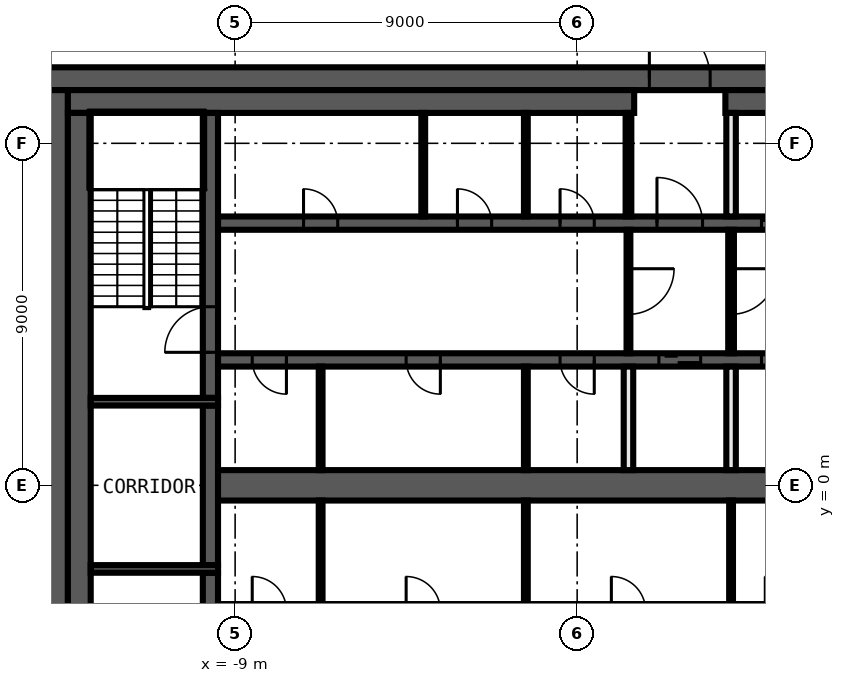
"""IFC4 building model, lengths in metres.
Left out: names, types, materials, properties, quantities, classifications, styles, units other than length and angle.
Written with IfcOpenShell. Run it as: python <this file> out.ifc"""

import sys

from ifc_helpers import new_model, si_unit, direction, frame, frame_2d, origin, place, context, subcontext, project, spatial, rectangle, extrude, element, fill, save


model = new_model("IFC4")
c1 = context("Model", 3, precision=1e-05, world=origin(), true_north=direction((0.0, 1.0)))
c2 = subcontext(c1, "Body", "Model", "MODEL_VIEW")
j1 = project(units=[si_unit("LENGTHUNIT", "METRE"), si_unit("PLANEANGLEUNIT", "RADIAN")], contexts=[c1])
p1 = place(None, origin())
s1 = spatial("IfcSite", under=j1, at=p1, CompositionType="ELEMENT")
p2 = place(p1, origin())
s2 = spatial("IfcBuilding", under=s1, at=p2, CompositionType="ELEMENT")
p3 = place(p2, frame((0.0, 0.0, 367.4)))
s3 = spatial("IfcBuildingStorey", under=s2, at=p3, CompositionType="ELEMENT", Elevation=367.4)
p4 = place(p3, frame((-11.138, 20.28, 0.0), z_axis=(0.0, 0.0, 1.0), x_axis=(-0.441342255748, -0.897338850876, 0.0)))
e1 = element("IfcWall", 1, at=p4, inside=s3, PredefinedType="SOLIDWALL", context=c2, shape_type="SweptSolid", body=[
    extrude(rectangle(XDim=28.805, YDim=0.25, at=frame_2d((14.403, 0.0))), origin(), (0.0, 0.0, 1.0), 3.8),
])
p5 = place(p3, frame((-14.0, 10.7, 0.0), z_axis=(0.0, 0.0, 1.0), x_axis=(1.0, 0.0, 0.0)))
e2 = element("IfcWall", 2, at=p5, inside=s3, PredefinedType="SHEAR", context=c2, shape_type="SweptSolid", body=[
    extrude(rectangle(XDim=28.0, YDim=0.6, at=frame_2d((14.0, 0.0))), origin(), (0.0, 0.0, 1.0), 3.8),
])
p6 = place(p5, frame((15.9, 0.0, 0.0)))
e3 = element("IfcOpeningElement", 3, at=p6, cuts=e2, PredefinedType="OPENING", context=c2, shape_type="SweptSolid", body=[
    extrude(rectangle(XDim=1.6, YDim=2.1, at=frame_2d((0.8, 1.05))), frame((0.0, 0.31, 0.0), z_axis=(0.0, -1.0, 0.0), x_axis=(1.0, 0.0, 0.0)), (0.0, 0.0, 1.0), 0.62),
])
p7 = place(p3, frame((-13.7, -10.4, 0.0), z_axis=(0.0, 0.0, 1.0), x_axis=(0.0, 1.0, 0.0)))
e4 = element("IfcWall", 4, at=p7, inside=s3, PredefinedType="SHEAR", context=c2, shape_type="SweptSolid", body=[
    extrude(rectangle(XDim=20.8, YDim=0.6, at=frame_2d((10.4, 0.0))), origin(), (0.0, 0.0, 1.0), 3.8),
])
p8 = place(p3, frame((-13.4, 10.1, 0.0), z_axis=(0.0, 0.0, 1.0), x_axis=(1.0, 0.0, 0.0)))
e5 = element("IfcWall", 5, at=p8, inside=s3, PredefinedType="SHEAR", context=c2, shape_type="SweptSolid", body=[
    extrude(rectangle(XDim=14.9, YDim=0.6, at=frame_2d((7.45, 0.0))), origin(), (0.0, 0.0, 1.0), 3.8),
])
p9 = place(p3, frame((3.9, 10.1, 0.0), z_axis=(0.0, 0.0, 1.0), x_axis=(1.0, 0.0, 0.0)))
e6 = element("IfcWall", 6, at=p9, inside=s3, PredefinedType="SHEAR", context=c2, shape_type="SweptSolid", body=[
    extrude(rectangle(XDim=9.5, YDim=0.6, at=frame_2d((4.75, 0.0))), origin(), (0.0, 0.0, 1.0), 3.8),
])
p10 = place(p3, frame((-13.1, -9.8, 0.0), z_axis=(0.0, 0.0, 1.0), x_axis=(0.0, 1.0, 0.0)))
e7 = element("IfcWall", 7, at=p10, inside=s3, PredefinedType="SHEAR", context=c2, shape_type="SweptSolid", body=[
    extrude(rectangle(XDim=19.6, YDim=0.6, at=frame_2d((9.8, 0.0))), origin(), (0.0, 0.0, 1.0), 3.8),
])
p11 = place(p3, frame((-9.65, -9.8, 0.0), z_axis=(0.0, 0.0, 1.0), x_axis=(0.0, 1.0, 0.0)))
e8 = element("IfcWall", 8, at=p11, inside=s3, PredefinedType="SHEAR", context=c2, shape_type="SweptSolid", body=[
    extrude(rectangle(XDim=7.5, YDim=0.4, at=frame_2d((3.75, 0.0))), origin(), (0.0, 0.0, 1.0), 3.8),
])
p12 = place(p11, frame((5.1, 0.0, 0.0)))
e9 = element("IfcOpeningElement", 9, at=p12, cuts=e8, PredefinedType="OPENING", context=c2, shape_type="SweptSolid", body=[
    extrude(rectangle(XDim=1.2, YDim=2.1, at=frame_2d((0.6, 1.05))), frame((0.0, 0.21, 0.0), z_axis=(0.0, -1.0, 0.0), x_axis=(1.0, 0.0, 0.0)), (0.0, 0.0, 1.0), 0.42),
])
p13 = place(p3, frame((-9.65, -2.1, 0.0), z_axis=(0.0, 0.0, 1.0), x_axis=(0.0, 1.0, 0.0)))
e10 = element("IfcWall", 10, at=p13, inside=s3, PredefinedType="SHEAR", context=c2, shape_type="SweptSolid", body=[
    extrude(rectangle(XDim=4.2, YDim=0.4, at=frame_2d((2.1, 0.0))), origin(), (0.0, 0.0, 1.0), 3.8),
])
p14 = place(p3, frame((-9.65, 2.3, 0.0), z_axis=(0.0, 0.0, 1.0), x_axis=(0.0, 1.0, 0.0)))
e11 = element("IfcWall", 11, at=p14, inside=s3, PredefinedType="SHEAR", context=c2, shape_type="SweptSolid", body=[
    extrude(rectangle(XDim=7.5, YDim=0.4, at=frame_2d((3.75, 0.0))), origin(), (0.0, 0.0, 1.0), 3.8),
])
p15 = place(p14, frame((1.2, 0.0, 0.0)))
e12 = element("IfcOpeningElement", 12, at=p15, cuts=e11, PredefinedType="OPENING", context=c2, shape_type="SweptSolid", body=[
    extrude(rectangle(XDim=1.2, YDim=2.1, at=frame_2d((0.6, 1.05))), frame((0.0, 0.21, 0.0), z_axis=(0.0, -1.0, 0.0), x_axis=(1.0, 0.0, 0.0)), (0.0, 0.0, 1.0), 0.42),
])
for number, where, z_axis, x_axis in (
    (13, (-9.45, 2.2, 0.0), (0.0, 0.0, 1.0), (-1.0, 0.0, 0.0)),
    (14, (-9.45, -2.2, 0.0), (0.0, 0.0, 1.0), (-1.0, 0.0, 0.0)),
):
    element("IfcWall", number, at=place(p3, frame(where, z_axis=z_axis, x_axis=x_axis)), inside=s3, PredefinedType="SHEAR", context=c2, shape_type="SweptSolid", body=[
        extrude(rectangle(XDim=3.35, YDim=0.2, at=frame_2d((1.675, 0.0))), origin(), (0.0, 0.0, 1.0), 3.8),
    ])
p16 = place(p3, frame((-9.45, 6.9, 0.0), z_axis=(0.0, 0.0, 1.0), x_axis=(1.0, 0.0, 0.0)))
e15 = element("IfcWall", 15, at=p16, inside=s3, PredefinedType="SHEAR", context=c2, shape_type="SweptSolid", body=[
    extrude(rectangle(XDim=18.9, YDim=0.35, at=frame_2d((9.45, 0.0))), origin(), (0.0, 0.0, 1.0), 3.8),
])
p17 = place(p16, frame((11.55, 0.0, 0.0)))
e16 = element("IfcOpeningElement", 16, at=p17, cuts=e15, PredefinedType="OPENING", context=c2, shape_type="SweptSolid", body=[
    extrude(rectangle(XDim=1.2, YDim=2.1, at=frame_2d((0.6, 1.05))), frame((0.0, 0.185, 0.0), z_axis=(0.0, -1.0, 0.0), x_axis=(1.0, 0.0, 0.0)), (0.0, 0.0, 1.0), 0.37),
])
p18 = place(p16, frame((14.3, 0.0, 0.0)))
e17 = element("IfcOpeningElement", 17, at=p18, cuts=e15, PredefinedType="OPENING", context=c2, shape_type="SweptSolid", body=[
    extrude(rectangle(XDim=1.1, YDim=2.1, at=frame_2d((0.55, 1.05))), frame((0.0, 0.185, 0.0), z_axis=(0.0, -1.0, 0.0), x_axis=(1.0, 0.0, 0.0)), (0.0, 0.0, 1.0), 0.37),
])
p19 = place(p16, frame((17.0, 0.0, 0.0)))
e18 = element("IfcOpeningElement", 18, at=p19, cuts=e15, PredefinedType="OPENING", context=c2, shape_type="SweptSolid", body=[
    extrude(rectangle(XDim=1.1, YDim=2.1, at=frame_2d((0.55, 1.05))), frame((0.0, 0.185, 0.0), z_axis=(0.0, -1.0, 0.0), x_axis=(1.0, 0.0, 0.0)), (0.0, 0.0, 1.0), 0.37),
])
p20 = place(p16, frame((2.25, 0.0, 0.0)))
e19 = element("IfcOpeningElement", 19, at=p20, cuts=e15, PredefinedType="OPENING", context=c2, shape_type="SweptSolid", body=[
    extrude(rectangle(XDim=0.9, YDim=2.1, at=frame_2d((0.45, 1.05))), frame((0.0, 0.185, 0.0), z_axis=(0.0, -1.0, 0.0), x_axis=(1.0, 0.0, 0.0)), (0.0, 0.0, 1.0), 0.37),
])
p21 = place(p16, frame((6.3, 0.0, 0.0)))
e20 = element("IfcOpeningElement", 20, at=p21, cuts=e15, PredefinedType="OPENING", context=c2, shape_type="SweptSolid", body=[
    extrude(rectangle(XDim=0.9, YDim=2.1, at=frame_2d((0.45, 1.05))), frame((0.0, 0.185, 0.0), z_axis=(0.0, -1.0, 0.0), x_axis=(1.0, 0.0, 0.0)), (0.0, 0.0, 1.0), 0.37),
])
p22 = place(p16, frame((9.0, 0.0, 0.0)))
e21 = element("IfcOpeningElement", 21, at=p22, cuts=e15, PredefinedType="OPENING", context=c2, shape_type="SweptSolid", body=[
    extrude(rectangle(XDim=0.9, YDim=2.1, at=frame_2d((0.45, 1.05))), frame((0.0, 0.185, 0.0), z_axis=(0.0, -1.0, 0.0), x_axis=(1.0, 0.0, 0.0)), (0.0, 0.0, 1.0), 0.37),
])
p23 = place(p3, frame((9.45, 3.3, 0.0), z_axis=(0.0, 0.0, 1.0), x_axis=(-1.0, 0.0, 0.0)))
e22 = element("IfcWall", 22, at=p23, inside=s3, PredefinedType="SHEAR", context=c2, shape_type="SweptSolid", body=[
    extrude(rectangle(XDim=18.9, YDim=0.35, at=frame_2d((9.45, 0.0))), origin(), (0.0, 0.0, 1.0), 3.8),
])
p24 = place(p23, frame((6.2, 0.0, 0.0)))
e23 = element("IfcOpeningElement", 23, at=p24, cuts=e22, PredefinedType="OPENING", context=c2, shape_type="SweptSolid", body=[
    extrude(rectangle(XDim=1.1, YDim=2.1, at=frame_2d((0.55, 1.05))), frame((0.0, 0.185, 0.0), z_axis=(0.0, -1.0, 0.0), x_axis=(1.0, 0.0, 0.0)), (0.0, 0.0, 1.0), 0.37),
])
p25 = place(p23, frame((3.5, 0.0, 0.0)))
e24 = element("IfcOpeningElement", 24, at=p25, cuts=e22, PredefinedType="OPENING", context=c2, shape_type="SweptSolid", body=[
    extrude(rectangle(XDim=1.1, YDim=2.1, at=frame_2d((0.55, 1.05))), frame((0.0, 0.185, 0.0), z_axis=(0.0, -1.0, 0.0), x_axis=(1.0, 0.0, 0.0)), (0.0, 0.0, 1.0), 0.37),
])
p26 = place(p23, frame((0.9, 0.0, 0.0)))
e25 = element("IfcOpeningElement", 25, at=p26, cuts=e22, PredefinedType="OPENING", context=c2, shape_type="SweptSolid", body=[
    extrude(rectangle(XDim=0.9, YDim=2.1, at=frame_2d((0.45, 1.05))), frame((0.0, 0.185, 0.0), z_axis=(0.0, -1.0, 0.0), x_axis=(1.0, 0.0, 0.0)), (0.0, 0.0, 1.0), 0.37),
])
p27 = place(p23, frame((17.1, 0.0, 0.0)))
e26 = element("IfcOpeningElement", 26, at=p27, cuts=e22, PredefinedType="OPENING", context=c2, shape_type="SweptSolid", body=[
    extrude(rectangle(XDim=0.9, YDim=2.1, at=frame_2d((0.45, 1.05))), frame((0.0, 0.185, 0.0), z_axis=(0.0, -1.0, 0.0), x_axis=(1.0, 0.0, 0.0)), (0.0, 0.0, 1.0), 0.37),
])
p28 = place(p23, frame((13.05, 0.0, 0.0)))
e27 = element("IfcOpeningElement", 27, at=p28, cuts=e22, PredefinedType="OPENING", context=c2, shape_type="SweptSolid", body=[
    extrude(rectangle(XDim=0.9, YDim=2.1, at=frame_2d((0.45, 1.05))), frame((0.0, 0.185, 0.0), z_axis=(0.0, -1.0, 0.0), x_axis=(1.0, 0.0, 0.0)), (0.0, 0.0, 1.0), 0.37),
])
p29 = place(p23, frame((9.0, 0.0, 0.0)))
e28 = element("IfcOpeningElement", 28, at=p29, cuts=e22, PredefinedType="OPENING", context=c2, shape_type="SweptSolid", body=[
    extrude(rectangle(XDim=0.9, YDim=2.1, at=frame_2d((0.45, 1.05))), frame((0.0, 0.185, 0.0), z_axis=(0.0, -1.0, 0.0), x_axis=(1.0, 0.0, 0.0)), (0.0, 0.0, 1.0), 0.37),
])
p30 = place(p3, frame((-9.45, 0.0, 0.0), z_axis=(0.0, 0.0, 1.0), x_axis=(1.0, 0.0, 0.0)))
e29 = element("IfcWall", 29, at=p30, inside=s3, PredefinedType="SHEAR", context=c2, shape_type="SweptSolid", body=[
    extrude(rectangle(XDim=18.9, YDim=0.8, at=frame_2d((9.45, 0.0))), origin(), (0.0, 0.0, 1.0), 3.8),
])
p31 = place(p3, frame((4.05, 6.725, 0.0), z_axis=(0.0, 0.0, 1.0), x_axis=(0.0, -1.0, 0.0)))
e30 = element("IfcWall", 30, at=p31, inside=s3, PredefinedType="PARTITIONING", context=c2, shape_type="SweptSolid", body=[
    extrude(rectangle(XDim=3.25, YDim=0.15, at=frame_2d((1.625, 0.0))), origin(), (0.0, 0.0, 1.0), 3.8),
])
p32 = place(p31, frame((1.025, 0.0, 0.0)))
e31 = element("IfcOpeningElement", 31, at=p32, cuts=e30, PredefinedType="OPENING", context=c2, shape_type="SweptSolid", body=[
    extrude(rectangle(XDim=1.2, YDim=2.1, at=frame_2d((0.6, 1.05))), frame((0.0, 0.085, 0.0), z_axis=(0.0, -1.0, 0.0), x_axis=(1.0, 0.0, 0.0)), (0.0, 0.0, 1.0), 0.17),
])
p33 = place(p3, frame((4.05, -3.125, 0.0), z_axis=(0.0, 0.0, 1.0), x_axis=(0.0, 1.0, 0.0)))
e32 = element("IfcWall", 32, at=p33, inside=s3, PredefinedType="PARTITIONING", context=c2, shape_type="SweptSolid", body=[
    extrude(rectangle(XDim=2.725, YDim=0.1, at=frame_2d((1.363, 0.0))), origin(), (0.0, 0.0, 1.0), 3.8),
])
for number, where, z_axis, x_axis in (
    (33, (4.05, 0.4, 0.0), (0.0, 0.0, 1.0), (0.0, 1.0, 0.0)),
    (34, (4.05, 7.075, 0.0), (0.0, 0.0, 1.0), (0.0, 1.0, 0.0)),
):
    element("IfcWall", number, at=place(p3, frame(where, z_axis=z_axis, x_axis=x_axis)), inside=s3, PredefinedType="SOLIDWALL", context=c2, shape_type="SweptSolid", body=[
        extrude(rectangle(XDim=2.725, YDim=0.25, at=frame_2d((1.363, 0.0))), origin(), (0.0, 0.0, 1.0), 3.8),
    ])
p34 = place(p3, frame((1.35, 7.075, 0.0), z_axis=(0.0, 0.0, 1.0), x_axis=(0.0, 1.0, 0.0)))
e35 = element("IfcWall", 35, at=p34, inside=s3, PredefinedType="PARTITIONING", context=c2, shape_type="SweptSolid", body=[
    extrude(rectangle(XDim=2.725, YDim=0.15, at=frame_2d((1.363, 0.0))), origin(), (0.0, 0.0, 1.0), 3.8),
])
p35 = place(p3, frame((1.35, 6.725, 0.0), z_axis=(0.0, 0.0, 1.0), x_axis=(0.0, -1.0, 0.0)))
e36 = element("IfcWall", 36, at=p35, inside=s3, PredefinedType="PARTITIONING", context=c2, shape_type="SweptSolid", body=[
    extrude(rectangle(XDim=3.25, YDim=0.1, at=frame_2d((1.625, 0.0))), origin(), (0.0, 0.0, 1.0), 3.8),
])
p36 = place(p35, frame((1.025, 0.0, 0.0)))
e37 = element("IfcOpeningElement", 37, at=p36, cuts=e36, PredefinedType="OPENING", context=c2, shape_type="SweptSolid", body=[
    extrude(rectangle(XDim=1.2, YDim=2.1, at=frame_2d((0.6, 1.05))), frame((0.0, 0.06, 0.0), z_axis=(0.0, -1.0, 0.0), x_axis=(1.0, 0.0, 0.0)), (0.0, 0.0, 1.0), 0.12),
])
p37 = place(p3, frame((1.35, 0.4, 0.0), z_axis=(0.0, 0.0, 1.0), x_axis=(0.0, 1.0, 0.0)))
e38 = element("IfcWall", 38, at=p37, inside=s3, PredefinedType="SOLIDWALL", context=c2, shape_type="SweptSolid", body=[
    extrude(rectangle(XDim=2.725, YDim=0.25, at=frame_2d((1.363, 0.0))), origin(), (0.0, 0.0, 1.0), 3.8),
])
for number, where, z_axis, x_axis in (
    (39, (-1.35, -3.125, 0.0), (0.0, 0.0, 1.0), (0.0, 1.0, 0.0)),
    (40, (-1.35, 0.4, 0.0), (0.0, 0.0, 1.0), (0.0, 1.0, 0.0)),
    (41, (-1.35, 7.075, 0.0), (0.0, 0.0, 1.0), (0.0, 1.0, 0.0)),
    (42, (-4.05, 7.075, 0.0), (0.0, 0.0, 1.0), (0.0, 1.0, 0.0)),
    (43, (-6.75, -3.125, 0.0), (0.0, 0.0, 1.0), (0.0, 1.0, 0.0)),
    (44, (-6.75, 0.4, 0.0), (0.0, 0.0, 1.0), (0.0, 1.0, 0.0)),
):
    element("IfcWall", number, at=place(p3, frame(where, z_axis=z_axis, x_axis=x_axis)), inside=s3, PredefinedType="PARTITIONING", context=c2, shape_type="SweptSolid", body=[
        extrude(rectangle(XDim=2.725, YDim=0.1, at=frame_2d((1.363, 0.0))), origin(), (0.0, 0.0, 1.0), 3.8),
    ])
p38 = place(p6, origin())
e45 = element("IfcDoor", 45, at=p38, inside=s3, OperationType="DOUBLE_DOOR_SINGLE_SWING", PredefinedType="DOOR", context=c2, shape_type="SweptSolid", body=[
    extrude(rectangle(XDim=1.6, YDim=2.1, at=frame_2d((0.8, 1.05))), frame((0.0, 0.025, 0.0), z_axis=(0.0, -1.0, 0.0), x_axis=(1.0, 0.0, 0.0)), (0.0, 0.0, 1.0), 0.05),
])
fill(e3, e45)
p39 = place(p17, origin())
e46 = element("IfcDoor", 46, at=p39, inside=s3, OperationType="SINGLE_SWING_LEFT", PredefinedType="DOOR", context=c2, shape_type="SweptSolid", body=[
    extrude(rectangle(XDim=1.2, YDim=2.1, at=frame_2d((0.6, 1.05))), frame((0.0, 0.025, 0.0), z_axis=(0.0, -1.0, 0.0), x_axis=(1.0, 0.0, 0.0)), (0.0, 0.0, 1.0), 0.05),
])
fill(e16, e46)
p40 = place(p18, origin())
e47 = element("IfcDoor", 47, at=p40, inside=s3, OperationType="DOUBLE_DOOR_SLIDING", PredefinedType="DOOR", context=c2, shape_type="SweptSolid", body=[
    extrude(rectangle(XDim=1.1, YDim=2.1, at=frame_2d((0.55, 1.05))), frame((0.0, 0.025, 0.0), z_axis=(0.0, -1.0, 0.0), x_axis=(1.0, 0.0, 0.0)), (0.0, 0.0, 1.0), 0.05),
])
fill(e17, e47)
p41 = place(p24, origin())
e48 = element("IfcDoor", 48, at=p41, inside=s3, OperationType="DOUBLE_DOOR_SLIDING", PredefinedType="DOOR", context=c2, shape_type="SweptSolid", body=[
    extrude(rectangle(XDim=1.1, YDim=2.1, at=frame_2d((0.55, 1.05))), frame((0.0, 0.025, 0.0), z_axis=(0.0, -1.0, 0.0), x_axis=(1.0, 0.0, 0.0)), (0.0, 0.0, 1.0), 0.05),
])
fill(e23, e48)
p42 = place(p25, origin())
e49 = element("IfcDoor", 49, at=p42, inside=s3, OperationType="DOUBLE_DOOR_SLIDING", PredefinedType="DOOR", context=c2, shape_type="SweptSolid", body=[
    extrude(rectangle(XDim=1.1, YDim=2.1, at=frame_2d((0.55, 1.05))), frame((0.0, 0.025, 0.0), z_axis=(0.0, -1.0, 0.0), x_axis=(1.0, 0.0, 0.0)), (0.0, 0.0, 1.0), 0.05),
])
fill(e24, e49)
p43 = place(p20, origin())
e50 = element("IfcDoor", 50, at=p43, inside=s3, OperationType="SINGLE_SWING_RIGHT", PredefinedType="DOOR", context=c2, shape_type="SweptSolid", body=[
    extrude(rectangle(XDim=0.9, YDim=2.1, at=frame_2d((0.45, 1.05))), frame((0.0, 0.025, 0.0), z_axis=(0.0, -1.0, 0.0), x_axis=(1.0, 0.0, 0.0)), (0.0, 0.0, 1.0), 0.05),
])
fill(e19, e50)
p44 = place(p21, origin())
e51 = element("IfcDoor", 51, at=p44, inside=s3, OperationType="SINGLE_SWING_LEFT", PredefinedType="DOOR", context=c2, shape_type="SweptSolid", body=[
    extrude(rectangle(XDim=0.9, YDim=2.1, at=frame_2d((0.45, 1.05))), frame((0.0, 0.025, 0.0), z_axis=(0.0, -1.0, 0.0), x_axis=(1.0, 0.0, 0.0)), (0.0, 0.0, 1.0), 0.05),
])
fill(e20, e51)
p45 = place(p22, origin())
e52 = element("IfcDoor", 52, at=p45, inside=s3, OperationType="SINGLE_SWING_RIGHT", PredefinedType="DOOR", context=c2, shape_type="SweptSolid", body=[
    extrude(rectangle(XDim=0.9, YDim=2.1, at=frame_2d((0.45, 1.05))), frame((0.0, 0.025, 0.0), z_axis=(0.0, -1.0, 0.0), x_axis=(1.0, 0.0, 0.0)), (0.0, 0.0, 1.0), 0.05),
])
fill(e21, e52)
p46 = place(p27, origin())
e53 = element("IfcDoor", 53, at=p46, inside=s3, OperationType="SINGLE_SWING_LEFT", PredefinedType="DOOR", context=c2, shape_type="SweptSolid", body=[
    extrude(rectangle(XDim=0.9, YDim=2.1, at=frame_2d((0.45, 1.05))), frame((0.0, 0.025, 0.0), z_axis=(0.0, -1.0, 0.0), x_axis=(1.0, 0.0, 0.0)), (0.0, 0.0, 1.0), 0.05),
])
fill(e26, e53)
p47 = place(p28, origin())
e54 = element("IfcDoor", 54, at=p47, inside=s3, OperationType="SINGLE_SWING_RIGHT", PredefinedType="DOOR", context=c2, shape_type="SweptSolid", body=[
    extrude(rectangle(XDim=0.9, YDim=2.1, at=frame_2d((0.45, 1.05))), frame((0.0, 0.025, 0.0), z_axis=(0.0, -1.0, 0.0), x_axis=(1.0, 0.0, 0.0)), (0.0, 0.0, 1.0), 0.05),
])
fill(e27, e54)
p48 = place(p29, origin())
e55 = element("IfcDoor", 55, at=p48, inside=s3, OperationType="SINGLE_SWING_LEFT", PredefinedType="DOOR", context=c2, shape_type="SweptSolid", body=[
    extrude(rectangle(XDim=0.9, YDim=2.1, at=frame_2d((0.45, 1.05))), frame((0.0, 0.025, 0.0), z_axis=(0.0, -1.0, 0.0), x_axis=(1.0, 0.0, 0.0)), (0.0, 0.0, 1.0), 0.05),
])
fill(e28, e55)
p49 = place(p15, origin())
e56 = element("IfcDoor", 56, at=p49, inside=s3, OperationType="SINGLE_SWING_RIGHT", PredefinedType="DOOR", context=c2, shape_type="SweptSolid", body=[
    extrude(rectangle(XDim=1.2, YDim=2.1, at=frame_2d((0.6, 1.05))), frame((0.0, 0.025, 0.0), z_axis=(0.0, -1.0, 0.0), x_axis=(1.0, 0.0, 0.0)), (0.0, 0.0, 1.0), 0.05),
])
fill(e12, e56)
p50 = place(p36, origin())
e57 = element("IfcDoor", 57, at=p50, inside=s3, OperationType="SINGLE_SWING_LEFT", PredefinedType="DOOR", context=c2, shape_type="SweptSolid", body=[
    extrude(rectangle(XDim=1.2, YDim=2.1, at=frame_2d((0.6, 1.05))), frame((0.0, 0.025, 0.0), z_axis=(0.0, -1.0, 0.0), x_axis=(1.0, 0.0, 0.0)), (0.0, 0.0, 1.0), 0.05),
])
fill(e37, e57)
p51 = place(p32, origin())
e58 = element("IfcDoor", 58, at=p51, inside=s3, OperationType="SINGLE_SWING_RIGHT", PredefinedType="DOOR", context=c2, shape_type="SweptSolid", body=[
    extrude(rectangle(XDim=1.2, YDim=2.1, at=frame_2d((0.6, 1.05))), frame((0.0, 0.025, 0.0), z_axis=(0.0, -1.0, 0.0), x_axis=(1.0, 0.0, 0.0)), (0.0, 0.0, 1.0), 0.05),
])
fill(e31, e58)
save(model, sys.argv[1])
